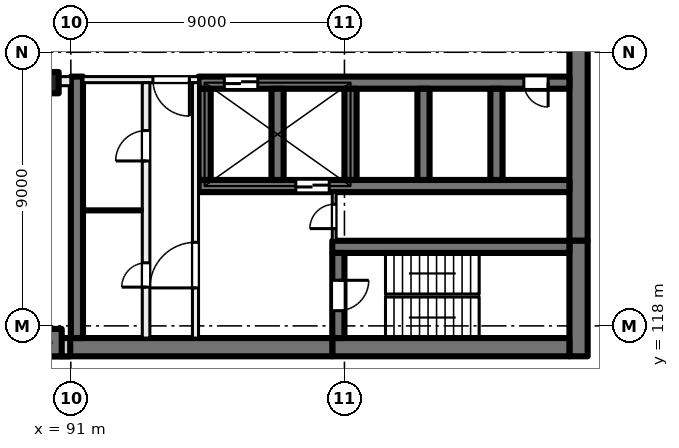
"""IFC4 building model, lengths in metres.
Left out: names, types, materials, properties, quantities, classifications, styles, units other than length and angle.
Written with IfcOpenShell. Run it as: python <this file> out.ifc"""

import sys

from ifc_helpers import new_model, si_unit, direction, frame, frame_2d, origin, origin_2d, place, context, subcontext, project, spatial, rectangle, extrude, element, fill, save


model = new_model("IFC4")
c1 = context("Model", 3, precision=1e-05, world=origin(), true_north=direction((0.0, 1.0)))
c2 = subcontext(c1, "Body", "Model", "MODEL_VIEW")
j1 = project(units=[si_unit("LENGTHUNIT", "METRE"), si_unit("PLANEANGLEUNIT", "RADIAN")], contexts=[c1])
p1 = place(None, origin())
s1 = spatial("IfcSite", under=j1, at=p1, CompositionType="ELEMENT")
p2 = place(p1, origin())
s2 = spatial("IfcBuilding", under=s1, at=p2, CompositionType="ELEMENT")
p3 = place(p2, frame((0.0, 0.0, 67.5)))
s3 = spatial("IfcBuildingStorey", under=s2, at=p3, CompositionType="ELEMENT", Elevation=67.5)
p4 = place(p3, frame((90.25, 126.0, 0.0), z_axis=(0.0, 0.0, 1.0), x_axis=(1.0, 0.0, 0.0)))
e1 = element("IfcColumn", 1, at=p4, inside=s3, PredefinedType="COLUMN", context=c2, shape_type="SweptSolid", body=[
    extrude(rectangle(XDim=0.7, YDim=0.7, at=origin_2d()), origin(), (0.0, 0.0, 1.0), 4.0),
])
p5 = place(p3, frame((90.25, 117.45, 0.0), z_axis=(0.0, 0.0, 1.0), x_axis=(1.0, 0.0, 0.0)))
e2 = element("IfcColumn", 2, at=p5, inside=s3, PredefinedType="COLUMN", context=c2, shape_type="SweptSolid", body=[
    extrude(rectangle(XDim=0.9, YDim=0.9, at=origin_2d()), origin(), (0.0, 0.0, 1.0), 4.0),
])
p6 = place(p3, frame((107.7, 135.2, 0.0), z_axis=(0.0, 0.0, 1.0), x_axis=(0.0, -1.0, 0.0)))
e3 = element("IfcWall", 3, at=p6, inside=s3, PredefinedType="SHEAR", context=c2, shape_type="SweptSolid", body=[
    extrude(rectangle(XDim=14.4, YDim=0.6, at=frame_2d((7.2, 0.0))), origin(), (0.0, 0.0, 1.0), 4.0),
])
p7 = place(p3, frame((107.7, 120.8, 0.0), z_axis=(0.0, 0.0, 1.0), x_axis=(0.0, -1.0, 0.0)))
e4 = element("IfcWall", 4, at=p7, inside=s3, PredefinedType="SHEAR", context=c2, shape_type="SweptSolid", body=[
    extrude(rectangle(XDim=3.8, YDim=0.6, at=frame_2d((1.9, 0.0))), origin(), (0.0, 0.0, 1.0), 4.0),
])
p8 = place(p3, frame((107.4, 117.3, 0.0), z_axis=(0.0, 0.0, 1.0), x_axis=(-1.0, 0.0, 0.0)))
e5 = element("IfcWall", 5, at=p8, inside=s3, PredefinedType="SHEAR", context=c2, shape_type="SweptSolid", body=[
    extrude(rectangle(XDim=7.8, YDim=0.6, at=frame_2d((3.9, 0.0))), origin(), (0.0, 0.0, 1.0), 4.0),
])
p9 = place(p3, frame((99.6, 117.3, 0.0), z_axis=(0.0, 0.0, 1.0), x_axis=(-1.0, 0.0, 0.0)))
e6 = element("IfcWall", 6, at=p9, inside=s3, PredefinedType="SHEAR", context=c2, shape_type="SweptSolid", body=[
    extrude(rectangle(XDim=8.9, YDim=0.6, at=frame_2d((4.45, 0.0))), origin(), (0.0, 0.0, 1.0), 4.0),
])
p10 = place(p3, frame((107.4, 120.6, 0.0), z_axis=(0.0, 0.0, 1.0), x_axis=(-1.0, 0.0, 0.0)))
e7 = element("IfcWall", 7, at=p10, inside=s3, PredefinedType="SHEAR", context=c2, shape_type="SweptSolid", body=[
    extrude(rectangle(XDim=7.8, YDim=0.4, at=frame_2d((3.9, 0.0))), origin(), (0.0, 0.0, 1.0), 4.0),
])
p11 = place(p3, frame((99.8, 120.4, 0.0), z_axis=(0.0, 0.0, 1.0), x_axis=(0.0, -1.0, 0.0)))
e8 = element("IfcWall", 8, at=p11, inside=s3, PredefinedType="SHEAR", context=c2, shape_type="SweptSolid", body=[
    extrude(rectangle(XDim=2.8, YDim=0.4, at=frame_2d((1.4, 0.0))), origin(), (0.0, 0.0, 1.0), 4.0),
])
p12 = place(p11, frame((0.9, 0.0, 0.0)))
e9 = element("IfcOpeningElement", 9, at=p12, cuts=e8, PredefinedType="OPENING", context=c2, shape_type="SweptSolid", body=[
    extrude(rectangle(XDim=1.0, YDim=2.1, at=frame_2d((0.5, 1.05))), frame((0.0, 0.21, 0.0), z_axis=(0.0, -1.0, 0.0), x_axis=(1.0, 0.0, 0.0)), (0.0, 0.0, 1.0), 0.42),
])
p13 = place(p3, frame((107.4, 126.0, 0.0), z_axis=(0.0, 0.0, 1.0), x_axis=(-1.0, 0.0, 0.0)))
e10 = element("IfcWall", 10, at=p13, inside=s3, PredefinedType="SHEAR", context=c2, shape_type="SweptSolid", body=[
    extrude(rectangle(XDim=12.2, YDim=0.4, at=frame_2d((6.1, 0.0))), origin(), (0.0, 0.0, 1.0), 4.0),
])
p14 = place(p13, frame((10.25, 0.0, 0.0)))
e11 = element("IfcOpeningElement", 11, at=p14, cuts=e10, PredefinedType="OPENING", context=c2, shape_type="SweptSolid", body=[
    extrude(rectangle(XDim=1.1, YDim=2.1, at=frame_2d((0.55, 1.05))), frame((0.0, 0.21, 0.0), z_axis=(0.0, -1.0, 0.0), x_axis=(1.0, 0.0, 0.0)), (0.0, 0.0, 1.0), 0.42),
])
p15 = place(p13, frame((0.7, 0.0, 0.0)))
e12 = element("IfcOpeningElement", 12, at=p15, cuts=e10, PredefinedType="OPENING", context=c2, shape_type="SweptSolid", body=[
    extrude(rectangle(XDim=0.8, YDim=2.1, at=frame_2d((0.4, 1.05))), frame((0.0, 0.21, 0.0), z_axis=(0.0, -1.0, 0.0), x_axis=(1.0, 0.0, 0.0)), (0.0, 0.0, 1.0), 0.42),
])
p16 = place(p3, frame((107.4, 122.6, 0.0), z_axis=(0.0, 0.0, 1.0), x_axis=(-1.0, 0.0, 0.0)))
e13 = element("IfcWall", 13, at=p16, inside=s3, PredefinedType="SHEAR", context=c2, shape_type="SweptSolid", body=[
    extrude(rectangle(XDim=12.2, YDim=0.4, at=frame_2d((6.1, 0.0))), origin(), (0.0, 0.0, 1.0), 4.0),
])
p17 = place(p16, frame((7.9, 0.0, 0.0)))
e14 = element("IfcOpeningElement", 14, at=p17, cuts=e13, PredefinedType="OPENING", context=c2, shape_type="SweptSolid", body=[
    extrude(rectangle(XDim=1.1, YDim=2.1, at=frame_2d((0.55, 1.05))), frame((0.0, 0.21, 0.0), z_axis=(0.0, -1.0, 0.0), x_axis=(1.0, 0.0, 0.0)), (0.0, 0.0, 1.0), 0.42),
])
for number, where, z_axis, x_axis in (
    (15, (105.0, 125.8, 0.0), (0.0, 0.0, 1.0), (0.0, -1.0, 0.0)),
    (16, (102.6, 125.8, 0.0), (0.0, 0.0, 1.0), (0.0, -1.0, 0.0)),
    (17, (100.2, 125.8, 0.0), (0.0, 0.0, 1.0), (0.0, -1.0, 0.0)),
    (18, (97.8, 125.8, 0.0), (0.0, 0.0, 1.0), (0.0, -1.0, 0.0)),
    (19, (95.4, 125.8, 0.0), (0.0, 0.0, 1.0), (0.0, -1.0, 0.0)),
):
    element("IfcWall", number, at=place(p3, frame(where, z_axis=z_axis, x_axis=x_axis)), inside=s3, PredefinedType="SHEAR", context=c2, shape_type="SweptSolid", body=[
        extrude(rectangle(XDim=3.0, YDim=0.4, at=frame_2d((1.5, 0.0))), origin(), (0.0, 0.0, 1.0), 4.0),
    ])
p18 = place(p3, frame((91.2, 126.2, 0.0), z_axis=(0.0, 0.0, 1.0), x_axis=(0.0, -1.0, 0.0)))
e20 = element("IfcWall", 20, at=p18, inside=s3, PredefinedType="SHEAR", context=c2, shape_type="SweptSolid", body=[
    extrude(rectangle(XDim=8.6, YDim=0.4, at=frame_2d((4.3, 0.0))), origin(), (0.0, 0.0, 1.0), 4.0),
])
p19 = place(p3, frame((90.98, 117.3, 0.0), z_axis=(0.0, 0.0, 1.0), x_axis=(-1.0, 0.0, 0.0)))
e21 = element("IfcWall", 21, at=p19, inside=s3, PredefinedType="SOLIDWALL", context=c2, shape_type="SweptSolid", body=[
    extrude(rectangle(XDim=33.745, YDim=0.6, at=frame_2d((16.873, 0.0))), origin(), (0.0, 0.0, 1.0), 3.625),
])
p20 = place(p19, frame((1.48, 0.0, 0.9)))
e22 = element("IfcOpeningElement", 22, at=p20, cuts=e21, PredefinedType="OPENING", context=c2, shape_type="SweptSolid", body=[
    extrude(rectangle(XDim=3.0, YDim=2.4, at=frame_2d((1.5, 1.2))), frame((0.0, 0.31, 0.0), z_axis=(0.0, -1.0, 0.0), x_axis=(1.0, 0.0, 0.0)), (0.0, 0.0, 1.0), 0.62),
])
p21 = place(p19, frame((5.98, 0.0, 0.9)))
e23 = element("IfcOpeningElement", 23, at=p21, cuts=e21, PredefinedType="OPENING", context=c2, shape_type="SweptSolid", body=[
    extrude(rectangle(XDim=3.0, YDim=2.4, at=frame_2d((1.5, 1.2))), frame((0.0, 0.31, 0.0), z_axis=(0.0, -1.0, 0.0), x_axis=(1.0, 0.0, 0.0)), (0.0, 0.0, 1.0), 0.62),
])
p22 = place(p19, frame((10.48, 0.0, 0.9)))
e24 = element("IfcOpeningElement", 24, at=p22, cuts=e21, PredefinedType="OPENING", context=c2, shape_type="SweptSolid", body=[
    extrude(rectangle(XDim=3.0, YDim=2.4, at=frame_2d((1.5, 1.2))), frame((0.0, 0.31, 0.0), z_axis=(0.0, -1.0, 0.0), x_axis=(1.0, 0.0, 0.0)), (0.0, 0.0, 1.0), 0.62),
])
p23 = place(p19, frame((14.98, 0.0, 0.9)))
e25 = element("IfcOpeningElement", 25, at=p23, cuts=e21, PredefinedType="OPENING", context=c2, shape_type="SweptSolid", body=[
    extrude(rectangle(XDim=3.0, YDim=2.4, at=frame_2d((1.5, 1.2))), frame((0.0, 0.31, 0.0), z_axis=(0.0, -1.0, 0.0), x_axis=(1.0, 0.0, 0.0)), (0.0, 0.0, 1.0), 0.62),
])
p24 = place(p19, frame((19.48, 0.0, 0.9)))
e26 = element("IfcOpeningElement", 26, at=p24, cuts=e21, PredefinedType="OPENING", context=c2, shape_type="SweptSolid", body=[
    extrude(rectangle(XDim=3.0, YDim=2.4, at=frame_2d((1.5, 1.2))), frame((0.0, 0.31, 0.0), z_axis=(0.0, -1.0, 0.0), x_axis=(1.0, 0.0, 0.0)), (0.0, 0.0, 1.0), 0.62),
])
p25 = place(p19, frame((23.98, 0.0, 0.9)))
e27 = element("IfcOpeningElement", 27, at=p25, cuts=e21, PredefinedType="OPENING", context=c2, shape_type="SweptSolid", body=[
    extrude(rectangle(XDim=3.0, YDim=2.4, at=frame_2d((1.5, 1.2))), frame((0.0, 0.31, 0.0), z_axis=(0.0, -1.0, 0.0), x_axis=(1.0, 0.0, 0.0)), (0.0, 0.0, 1.0), 0.62),
])
p26 = place(p19, frame((29.08, 0.0, 0.0)))
e28 = element("IfcOpeningElement", 28, at=p26, cuts=e21, PredefinedType="OPENING", context=c2, shape_type="SweptSolid", body=[
    extrude(rectangle(XDim=1.8, YDim=2.4, at=frame_2d((0.9, 1.2))), frame((0.0, 0.31, 0.0), z_axis=(0.0, -1.0, 0.0), x_axis=(1.0, 0.0, 0.0)), (0.0, 0.0, 1.0), 0.62),
])
p27 = place(p3, frame((95.2, 126.1, 0.0), z_axis=(0.0, 0.0, 1.0), x_axis=(-1.0, 0.0, 0.0)))
e29 = element("IfcWall", 29, at=p27, inside=s3, PredefinedType="PARTITIONING", context=c2, shape_type="SweptSolid", body=[
    extrude(rectangle(XDim=3.8, YDim=0.2, at=frame_2d((1.9, 0.0))), origin(), (0.0, 0.0, 1.0), 3.625),
])
p28 = place(p27, frame((0.3, 0.0, 0.0)))
e30 = element("IfcOpeningElement", 30, at=p28, cuts=e29, PredefinedType="OPENING", context=c2, shape_type="SweptSolid", body=[
    extrude(rectangle(XDim=1.2, YDim=2.1, at=frame_2d((0.6, 1.05))), frame((0.0, 0.11, 0.0), z_axis=(0.0, -1.0, 0.0), x_axis=(1.0, 0.0, 0.0)), (0.0, 0.0, 1.0), 0.22),
])
p29 = place(p3, frame((95.1, 117.6, 0.0), z_axis=(0.0, 0.0, 1.0), x_axis=(0.0, 1.0, 0.0)))
e31 = element("IfcWall", 31, at=p29, inside=s3, PredefinedType="PARTITIONING", context=c2, shape_type="SweptSolid", body=[
    extrude(rectangle(XDim=8.4, YDim=0.2, at=frame_2d((4.2, 0.0))), origin(), (0.0, 0.0, 1.0), 3.625),
])
p30 = place(p29, frame((1.65, 0.0, 0.0)))
e32 = element("IfcOpeningElement", 32, at=p30, cuts=e31, PredefinedType="OPENING", context=c2, shape_type="SweptSolid", body=[
    extrude(rectangle(XDim=1.5, YDim=2.1, at=frame_2d((0.75, 1.05))), frame((0.0, 0.11, 0.0), z_axis=(0.0, -1.0, 0.0), x_axis=(1.0, 0.0, 0.0)), (0.0, 0.0, 1.0), 0.22),
])
p31 = place(p3, frame((93.475, 117.6, 0.0), z_axis=(0.0, 0.0, 1.0), x_axis=(0.0, 1.0, 0.0)))
e33 = element("IfcWall", 33, at=p31, inside=s3, PredefinedType="PARTITIONING", context=c2, shape_type="SweptSolid", body=[
    extrude(rectangle(XDim=8.4, YDim=0.25, at=frame_2d((4.2, 0.0))), origin(), (0.0, 0.0, 1.0), 3.625),
])
p32 = place(p31, frame((5.825, 0.0, 0.0)))
e34 = element("IfcOpeningElement", 34, at=p32, cuts=e33, PredefinedType="OPENING", context=c2, shape_type="SweptSolid", body=[
    extrude(rectangle(XDim=1.0, YDim=2.1, at=frame_2d((0.5, 1.05))), frame((0.0, 0.135, 0.0), z_axis=(0.0, -1.0, 0.0), x_axis=(1.0, 0.0, 0.0)), (0.0, 0.0, 1.0), 0.27),
])
p33 = place(p31, frame((1.675, 0.0, 0.0)))
e35 = element("IfcOpeningElement", 35, at=p33, cuts=e33, PredefinedType="OPENING", context=c2, shape_type="SweptSolid", body=[
    extrude(rectangle(XDim=0.8, YDim=2.1, at=frame_2d((0.4, 1.05))), frame((0.0, 0.135, 0.0), z_axis=(0.0, -1.0, 0.0), x_axis=(1.0, 0.0, 0.0)), (0.0, 0.0, 1.0), 0.27),
])
p34 = place(p3, frame((99.663, 120.8, 0.0), z_axis=(0.0, 0.0, 1.0), x_axis=(0.0, 1.0, 0.0)))
e36 = element("IfcWall", 36, at=p34, inside=s3, PredefinedType="PARTITIONING", context=c2, shape_type="SweptSolid", body=[
    extrude(rectangle(XDim=1.6, YDim=0.125, at=frame_2d((0.8, 0.0))), origin(), (0.0, 0.0, 1.0), 3.625),
])
p35 = place(p34, frame((0.4, 0.0, 0.0)))
e37 = element("IfcOpeningElement", 37, at=p35, cuts=e36, PredefinedType="OPENING", context=c2, shape_type="SweptSolid", body=[
    extrude(rectangle(XDim=0.8, YDim=2.1, at=frame_2d((0.4, 1.05))), frame((0.0, 0.073, 0.0), z_axis=(0.0, -1.0, 0.0), x_axis=(1.0, 0.0, 0.0)), (0.0, 0.0, 1.0), 0.145),
])
p36 = place(p3, frame((93.35, 121.8, 0.0), z_axis=(0.0, 0.0, 1.0), x_axis=(-1.0, 0.0, 0.0)))
e38 = element("IfcWall", 38, at=p36, inside=s3, PredefinedType="PARTITIONING", context=c2, shape_type="SweptSolid", body=[
    extrude(rectangle(XDim=1.95, YDim=0.1, at=frame_2d((0.975, 0.0))), origin(), (0.0, 0.0, 1.0), 3.625),
])
p37 = place(p3, frame((91.0, 126.05, 0.0), z_axis=(0.0, 0.0, 1.0), x_axis=(-1.0, 0.0, 0.0)))
e39 = element("IfcWall", 39, at=p37, inside=s3, PredefinedType="PARTITIONING", context=c2, shape_type="SweptSolid", body=[
    extrude(rectangle(XDim=43.785, YDim=0.3, at=frame_2d((21.893, 0.0))), origin(), (0.0, 0.0, 1.0), 3.625),
])
p38 = place(p37, frame((2.125, 0.0, 0.0)))
e40 = element("IfcOpeningElement", 40, at=p38, cuts=e39, PredefinedType="OPENING", context=c2, shape_type="SweptSolid", body=[
    extrude(rectangle(XDim=1.0, YDim=2.1, at=frame_2d((0.5, 1.05))), frame((0.0, 0.16, 0.0), z_axis=(0.0, -1.0, 0.0), x_axis=(1.0, 0.0, 0.0)), (0.0, 0.0, 1.0), 0.32),
])
p39 = place(p37, frame((7.0, 0.0, 0.0)))
e41 = element("IfcOpeningElement", 41, at=p39, cuts=e39, PredefinedType="OPENING", context=c2, shape_type="SweptSolid", body=[
    extrude(rectangle(XDim=1.0, YDim=2.1, at=frame_2d((0.5, 1.05))), frame((0.0, 0.16, 0.0), z_axis=(0.0, -1.0, 0.0), x_axis=(1.0, 0.0, 0.0)), (0.0, 0.0, 1.0), 0.32),
])
p40 = place(p37, frame((11.5, 0.0, 0.0)))
e42 = element("IfcOpeningElement", 42, at=p40, cuts=e39, PredefinedType="OPENING", context=c2, shape_type="SweptSolid", body=[
    extrude(rectangle(XDim=1.0, YDim=2.1, at=frame_2d((0.5, 1.05))), frame((0.0, 0.16, 0.0), z_axis=(0.0, -1.0, 0.0), x_axis=(1.0, 0.0, 0.0)), (0.0, 0.0, 1.0), 0.32),
])
p41 = place(p37, frame((21.35, 0.0, 0.0)))
e43 = element("IfcOpeningElement", 43, at=p41, cuts=e39, PredefinedType="OPENING", context=c2, shape_type="SweptSolid", body=[
    extrude(rectangle(XDim=0.8, YDim=2.1, at=frame_2d((0.4, 1.05))), frame((0.0, 0.16, 0.0), z_axis=(0.0, -1.0, 0.0), x_axis=(1.0, 0.0, 0.0)), (0.0, 0.0, 1.0), 0.32),
])
p42 = place(p37, frame((16.75, 0.0, 0.0)))
e44 = element("IfcOpeningElement", 44, at=p42, cuts=e39, PredefinedType="OPENING", context=c2, shape_type="SweptSolid", body=[
    extrude(rectangle(XDim=1.0, YDim=2.1, at=frame_2d((0.5, 1.05))), frame((0.0, 0.16, 0.0), z_axis=(0.0, -1.0, 0.0), x_axis=(1.0, 0.0, 0.0)), (0.0, 0.0, 1.0), 0.32),
])
p43 = place(p37, frame((25.0, 0.0, 0.0)))
e45 = element("IfcOpeningElement", 45, at=p43, cuts=e39, PredefinedType="OPENING", context=c2, shape_type="SweptSolid", body=[
    extrude(rectangle(XDim=1.0, YDim=2.1, at=frame_2d((0.5, 1.05))), frame((0.0, 0.16, 0.0), z_axis=(0.0, -1.0, 0.0), x_axis=(1.0, 0.0, 0.0)), (0.0, 0.0, 1.0), 0.32),
])
p44 = place(p37, frame((39.296, 0.0, 0.0)))
e46 = element("IfcOpeningElement", 46, at=p44, cuts=e39, PredefinedType="OPENING", context=c2, shape_type="SweptSolid", body=[
    extrude(rectangle(XDim=1.8, YDim=2.1, at=frame_2d((0.9, 1.05))), frame((0.0, 0.16, 0.0), z_axis=(0.0, -1.0, 0.0), x_axis=(1.0, 0.0, 0.0)), (0.0, 0.0, 1.0), 0.32),
])
p45 = place(p14, origin())
e47 = element("IfcDoor", 47, at=p45, inside=s3, OperationType="DOUBLE_DOOR_SLIDING", PredefinedType="DOOR", context=c2, shape_type="SweptSolid", body=[
    extrude(rectangle(XDim=1.1, YDim=2.1, at=frame_2d((0.55, 1.05))), frame((0.0, 0.025, 0.0), z_axis=(0.0, -1.0, 0.0), x_axis=(1.0, 0.0, 0.0)), (0.0, 0.0, 1.0), 0.05),
])
fill(e11, e47)
p46 = place(p15, origin())
e48 = element("IfcDoor", 48, at=p46, inside=s3, OperationType="SINGLE_SWING_LEFT", PredefinedType="DOOR", context=c2, shape_type="SweptSolid", body=[
    extrude(rectangle(XDim=0.8, YDim=2.1, at=frame_2d((0.4, 1.05))), frame((0.0, 0.025, 0.0), z_axis=(0.0, -1.0, 0.0), x_axis=(1.0, 0.0, 0.0)), (0.0, 0.0, 1.0), 0.05),
])
fill(e12, e48)
p47 = place(p28, origin())
e49 = element("IfcDoor", 49, at=p47, inside=s3, OperationType="DOUBLE_DOOR_SINGLE_SWING", PredefinedType="DOOR", context=c2, shape_type="SweptSolid", body=[
    extrude(rectangle(XDim=1.2, YDim=2.1, at=frame_2d((0.6, 1.05))), frame((0.0, 0.025, 0.0), z_axis=(0.0, -1.0, 0.0), x_axis=(1.0, 0.0, 0.0)), (0.0, 0.0, 1.0), 0.05),
])
fill(e30, e49)
p48 = place(p30, origin())
e50 = element("IfcDoor", 50, at=p48, inside=s3, OperationType="DOUBLE_DOOR_SINGLE_SWING", PredefinedType="DOOR", context=c2, shape_type="SweptSolid", body=[
    extrude(rectangle(XDim=1.5, YDim=2.1, at=frame_2d((0.75, 1.05))), frame((0.0, 0.025, 0.0), z_axis=(0.0, -1.0, 0.0), x_axis=(1.0, 0.0, 0.0)), (0.0, 0.0, 1.0), 0.05),
])
fill(e32, e50)
p49 = place(p12, origin())
e51 = element("IfcDoor", 51, at=p49, inside=s3, OperationType="SINGLE_SWING_LEFT", PredefinedType="DOOR", context=c2, shape_type="SweptSolid", body=[
    extrude(rectangle(XDim=1.0, YDim=2.1, at=frame_2d((0.5, 1.05))), frame((0.0, 0.025, 0.0), z_axis=(0.0, -1.0, 0.0), x_axis=(1.0, 0.0, 0.0)), (0.0, 0.0, 1.0), 0.05),
])
fill(e9, e51)
p50 = place(p35, origin())
e52 = element("IfcDoor", 52, at=p50, inside=s3, OperationType="SINGLE_SWING_RIGHT", PredefinedType="DOOR", context=c2, shape_type="SweptSolid", body=[
    extrude(rectangle(XDim=0.8, YDim=2.1, at=frame_2d((0.4, 1.05))), frame((0.0, 0.025, 0.0), z_axis=(0.0, -1.0, 0.0), x_axis=(1.0, 0.0, 0.0)), (0.0, 0.0, 1.0), 0.05),
])
fill(e37, e52)
p51 = place(p32, origin())
e53 = element("IfcDoor", 53, at=p51, inside=s3, OperationType="SINGLE_SWING_LEFT", PredefinedType="DOOR", context=c2, shape_type="SweptSolid", body=[
    extrude(rectangle(XDim=1.0, YDim=2.1, at=frame_2d((0.5, 1.05))), frame((0.0, 0.025, 0.0), z_axis=(0.0, -1.0, 0.0), x_axis=(1.0, 0.0, 0.0)), (0.0, 0.0, 1.0), 0.05),
])
fill(e34, e53)
p52 = place(p33, origin())
e54 = element("IfcDoor", 54, at=p52, inside=s3, OperationType="SINGLE_SWING_RIGHT", PredefinedType="DOOR", context=c2, shape_type="SweptSolid", body=[
    extrude(rectangle(XDim=0.8, YDim=2.1, at=frame_2d((0.4, 1.05))), frame((0.0, 0.025, 0.0), z_axis=(0.0, -1.0, 0.0), x_axis=(1.0, 0.0, 0.0)), (0.0, 0.0, 1.0), 0.05),
])
fill(e35, e54)
p53 = place(p17, origin())
e55 = element("IfcDoor", 55, at=p53, inside=s3, OperationType="DOUBLE_DOOR_SLIDING", PredefinedType="DOOR", context=c2, shape_type="SweptSolid", body=[
    extrude(rectangle(XDim=1.1, YDim=2.1, at=frame_2d((0.55, 1.05))), frame((0.0, 0.025, 0.0), z_axis=(0.0, -1.0, 0.0), x_axis=(1.0, 0.0, 0.0)), (0.0, 0.0, 1.0), 0.05),
])
fill(e14, e55)
save(model, sys.argv[1])
